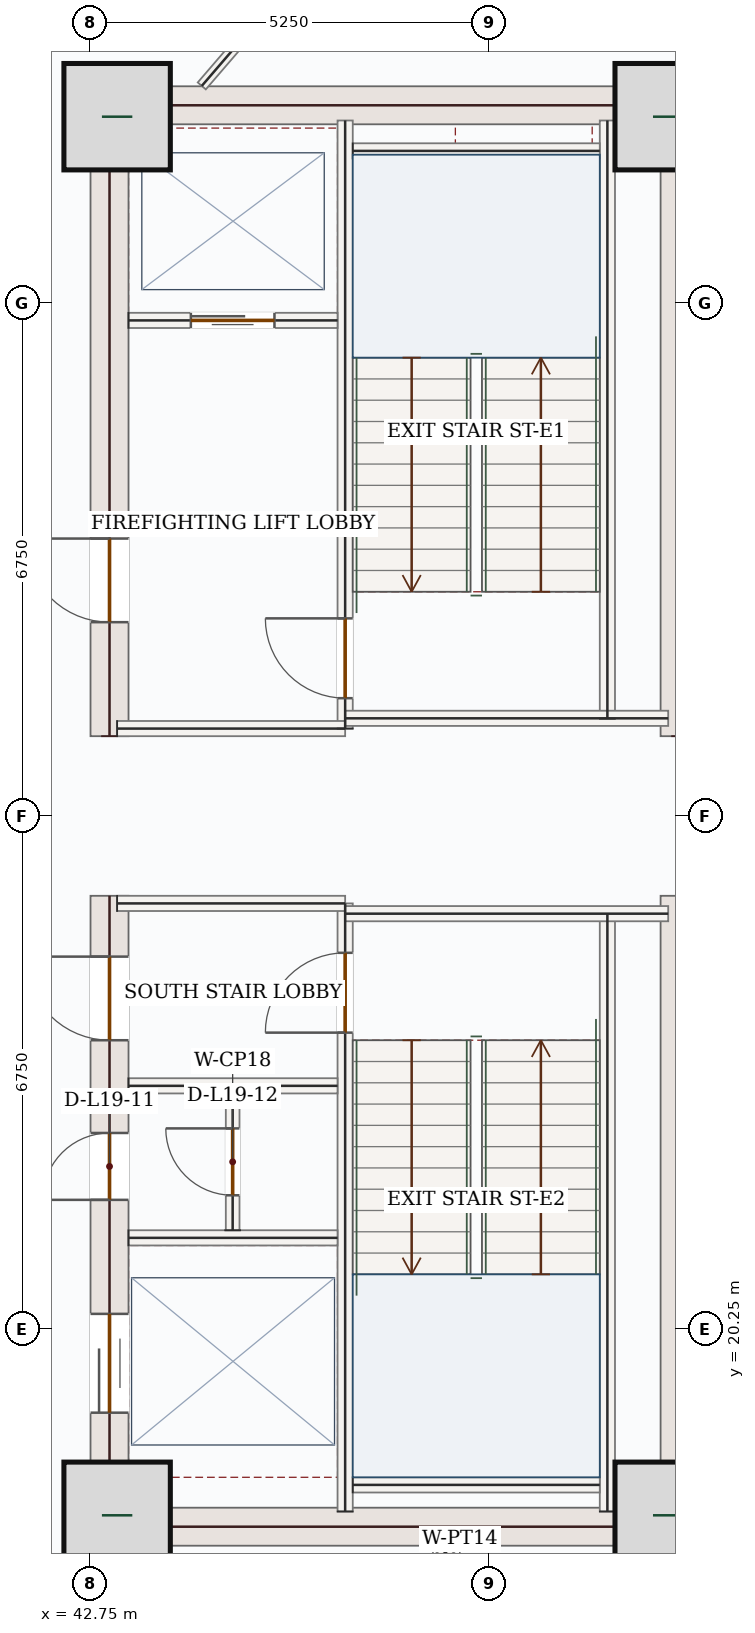
"""IFC4 building model, lengths in metres.
Left out: names, types, materials, properties, quantities, classifications, styles, units other than length and angle.
Written with IfcOpenShell. Run it as: python <this file> out.ifc"""

import sys

from ifc_helpers import new_model, si_unit, direction, frame, frame_2d, origin, origin_2d, place, context, subcontext, project, spatial, rectangle, extrude, source, transform, mapped, element, fill, save


model = new_model("IFC4")
c1 = context("Model", 3, precision=1e-05, world=origin(), true_north=direction((0.0, 1.0)))
c2 = subcontext(c1, "Body", "Model", "MODEL_VIEW")
j1 = project(units=[si_unit("LENGTHUNIT", "METRE"), si_unit("PLANEANGLEUNIT", "RADIAN")], contexts=[c1])
p1 = place(None, origin())
s1 = spatial("IfcSite", under=j1, at=p1, CompositionType="ELEMENT")
p2 = place(p1, origin())
s2 = spatial("IfcBuilding", under=s1, at=p2, CompositionType="ELEMENT")
p3 = place(p2, frame((0.0, 0.0, 87.9)))
s3 = spatial("IfcBuildingStorey", under=s2, at=p3, CompositionType="ELEMENT", Elevation=87.9)
p4 = place(p3, frame((43.0, 17.4, 0.0), z_axis=(0.0, 0.0, 1.0), x_axis=(0.0, 1.0, 0.0)))
e1 = element("IfcWall", 1, at=p4, inside=s3, PredefinedType="SHEAR", context=c2, shape_type="SweptSolid", body=[
    extrude(rectangle(XDim=8.55, YDim=0.5, at=frame_2d((4.275, 0.0))), origin(), (0.0, 0.0, 1.0), 3.95),
])
p5 = place(p4, frame((6.65, 0.0, 0.0)))
e2 = element("IfcOpeningElement", 2, at=p5, cuts=e1, PredefinedType="OPENING", context=c2, shape_type="SweptSolid", body=[
    extrude(rectangle(XDim=1.1, YDim=2.2, at=frame_2d((0.55, 1.1))), frame((0.0, 0.26, 0.0), z_axis=(0.0, -1.0, 0.0), x_axis=(1.0, 0.0, 0.0)), (0.0, 0.0, 1.0), 0.52),
])
p6 = place(p4, frame((1.75, 0.0, 0.0)))
e3 = element("IfcOpeningElement", 3, at=p6, cuts=e1, PredefinedType="OPENING", context=c2, shape_type="SweptSolid", body=[
    extrude(rectangle(XDim=1.3, YDim=2.2, at=frame_2d((0.65, 1.1))), frame((0.0, 0.26, 0.0), z_axis=(0.0, -1.0, 0.0), x_axis=(1.0, 0.0, 0.0)), (0.0, 0.0, 1.0), 0.52),
])
p7 = place(p4, frame((4.55, 0.0, 0.0)))
e4 = element("IfcOpeningElement", 4, at=p7, cuts=e1, PredefinedType="OPENING", context=c2, shape_type="SweptSolid", body=[
    extrude(rectangle(XDim=0.88, YDim=2.1, at=frame_2d((0.44, 1.05))), frame((0.0, 0.26, 0.0), z_axis=(0.0, -1.0, 0.0), x_axis=(1.0, 0.0, 0.0)), (0.0, 0.0, 1.0), 0.52),
])
p8 = place(p3, frame((43.0, 28.05, 0.0), z_axis=(0.0, 0.0, 1.0), x_axis=(0.0, 1.0, 0.0)))
e5 = element("IfcWall", 5, at=p8, inside=s3, PredefinedType="SHEAR", context=c2, shape_type="SweptSolid", body=[
    extrude(rectangle(XDim=8.55, YDim=0.5, at=frame_2d((4.275, 0.0))), origin(), (0.0, 0.0, 1.0), 3.95),
])
p9 = place(p8, frame((1.5, 0.0, 0.0)))
e6 = element("IfcOpeningElement", 6, at=p9, cuts=e5, PredefinedType="OPENING", context=c2, shape_type="SweptSolid", body=[
    extrude(rectangle(XDim=1.1, YDim=2.2, at=frame_2d((0.55, 1.1))), frame((0.0, 0.26, 0.0), z_axis=(0.0, -1.0, 0.0), x_axis=(1.0, 0.0, 0.0)), (0.0, 0.0, 1.0), 0.52),
])
m1 = source(origin(), c2, "Body", "SweptSolid", [
    extrude(rectangle(XDim=8.55, YDim=0.5, at=frame_2d((4.275, 0.0))), origin(), (0.0, 0.0, 1.0), 3.95),
])
for number, where, z_axis, x_axis in (
    (7, (50.5, 17.4, 0.0), (0.0, 0.0, 1.0), (0.0, 1.0, 0.0)),
    (8, (50.5, 28.05, 0.0), (0.0, 0.0, 1.0), (0.0, 1.0, 0.0)),
):
    element("IfcWall", number, at=place(p3, frame(where, z_axis=z_axis, x_axis=x_axis)), inside=s3, PredefinedType="SHEAR", context=c2, shape_type="MappedRepresentation", body=[
        mapped(m1, transform((0.0, 0.0, 0.0), x_axis=(1.0, 0.0, 0.0), y_axis=(0.0, 1.0, 0.0), z_axis=(0.0, 0.0, 1.0), scale=1.0)),
    ])
m2 = source(origin(), c2, "Body", "SweptSolid", [
    extrude(rectangle(XDim=7.0, YDim=0.5, at=frame_2d((3.5, 0.0))), origin(), (0.0, 0.0, 1.0), 3.95),
])
for number, where, z_axis, x_axis in (
    (9, (43.25, 17.65, 0.0), (0.0, 0.0, 1.0), (1.0, 0.0, 0.0)),
    (10, (43.25, 36.35, 0.0), (0.0, 0.0, 1.0), (1.0, 0.0, 0.0)),
):
    element("IfcWall", number, at=place(p3, frame(where, z_axis=z_axis, x_axis=x_axis)), inside=s3, PredefinedType="SHEAR", context=c2, shape_type="MappedRepresentation", body=[
        mapped(m2, transform((0.0, 0.0, 0.0), x_axis=(1.0, 0.0, 0.0), y_axis=(0.0, 1.0, 0.0), z_axis=(0.0, 0.0, 1.0), scale=1.0)),
    ])
m3 = source(origin(), c2, "Body", "SweptSolid", [
    extrude(rectangle(XDim=1.4, YDim=1.4, at=origin_2d()), origin(), (0.0, 0.0, 1.0), 4.2),
])
for number, where, z_axis, x_axis in (
    (11, (43.1, 17.8, 0.0), (0.0, 0.0, 1.0), (1.0, 0.0, 0.0)),
    (12, (50.35, 17.8, 0.0), (0.0, 0.0, 1.0), (1.0, 0.0, 0.0)),
    (13, (43.1, 36.2, 0.0), (0.0, 0.0, 1.0), (1.0, 0.0, 0.0)),
    (14, (50.35, 36.2, 0.0), (0.0, 0.0, 1.0), (1.0, 0.0, 0.0)),
):
    element("IfcColumn", number, at=place(p3, frame(where, z_axis=z_axis, x_axis=x_axis)), inside=s3, PredefinedType="COLUMN", context=c2, shape_type="MappedRepresentation", body=[
        mapped(m3, transform((0.0, 0.0, 0.0), x_axis=(1.0, 0.0, 0.0), y_axis=(0.0, 1.0, 0.0), z_axis=(0.0, 0.0, 1.0), scale=1.0)),
    ])
p10 = place(p3, frame((53.06, 18.458, 0.0), z_axis=(0.0, 0.0, 1.0), x_axis=(-0.707106781187, -0.707106781187, 0.0)))
e15 = element("IfcWall", 15, at=p10, inside=s3, PredefinedType="SOLIDWALL", context=c2, shape_type="SweptSolid", body=[
    extrude(rectangle(XDim=5.258, YDim=0.32, at=frame_2d((2.629, 0.0))), origin(), (0.0, 0.0, 1.0), 3.95),
])
p11 = place(p10, frame((1.429, 0.0, 0.85)))
e16 = element("IfcOpeningElement", 16, at=p11, cuts=e15, PredefinedType="OPENING", context=c2, shape_type="SweptSolid", body=[
    extrude(rectangle(XDim=2.4, YDim=1.8, at=frame_2d((1.2, 0.9))), frame((0.0, 0.17, 0.0), z_axis=(0.0, -1.0, 0.0), x_axis=(1.0, 0.0, 0.0)), (0.0, 0.0, 1.0), 0.34),
])
m4 = source(origin(), c2, "Body", "SweptSolid", [
    extrude(rectangle(XDim=5.623, YDim=0.32, at=frame_2d((2.812, 0.0))), origin(), (0.0, 0.0, 1.0), 3.95),
])
p12 = place(p3, frame((49.342, 39.26, 0.0), z_axis=(0.0, 0.0, 1.0), x_axis=(0.66122376427, -0.750188731963, 0.0)))
e17 = element("IfcWall", 17, at=p12, inside=s3, PredefinedType="SOLIDWALL", context=c2, shape_type="MappedRepresentation", body=[
    mapped(m4, transform((0.0, 0.0, 0.0), x_axis=(1.0, 0.0, 0.0), y_axis=(0.0, 1.0, 0.0), z_axis=(0.0, 0.0, 1.0), scale=1.0)),
])
m5 = source(origin(), c2, "Body", "SweptSolid", [
    extrude(rectangle(XDim=7.87, YDim=0.2, at=frame_2d((3.935, 0.0))), origin(), (0.0, 0.0, 1.0), 3.95),
])
for number, where, z_axis, x_axis in (
    (18, (49.55, 17.85, 0.0), (0.0, 0.0, 1.0), (0.0, 1.0, 0.0)),
    (19, (49.55, 28.28, 0.0), (0.0, 0.0, 1.0), (0.0, 1.0, 0.0)),
):
    element("IfcWall", number, at=place(p3, frame(where, z_axis=z_axis, x_axis=x_axis)), inside=s3, PredefinedType="SOLIDWALL", context=c2, shape_type="MappedRepresentation", body=[
        mapped(m5, transform((0.0, 0.0, 0.0), x_axis=(1.0, 0.0, 0.0), y_axis=(0.0, 1.0, 0.0), z_axis=(0.0, 0.0, 1.0), scale=1.0)),
    ])
p13 = place(p3, frame((46.1, 17.85, 0.0), z_axis=(0.0, 0.0, 1.0), x_axis=(0.0, 1.0, 0.0)))
e20 = element("IfcWall", 20, at=p13, inside=s3, PredefinedType="SOLIDWALL", context=c2, shape_type="SweptSolid", body=[
    extrude(rectangle(XDim=8.0, YDim=0.2, at=frame_2d((4.0, 0.0))), origin(), (0.0, 0.0, 1.0), 3.95),
])
p14 = place(p13, frame((6.3, 0.0, 0.0)))
e21 = element("IfcOpeningElement", 21, at=p14, cuts=e20, PredefinedType="OPENING", context=c2, shape_type="SweptSolid", body=[
    extrude(rectangle(XDim=1.05, YDim=2.15, at=frame_2d((0.525, 1.075))), frame((0.0, 0.11, 0.0), z_axis=(0.0, -1.0, 0.0), x_axis=(1.0, 0.0, 0.0)), (0.0, 0.0, 1.0), 0.22),
])
p15 = place(p3, frame((46.1, 28.15, 0.0), z_axis=(0.0, 0.0, 1.0), x_axis=(0.0, 1.0, 0.0)))
e22 = element("IfcWall", 22, at=p15, inside=s3, PredefinedType="SOLIDWALL", context=c2, shape_type="SweptSolid", body=[
    extrude(rectangle(XDim=8.0, YDim=0.2, at=frame_2d((4.0, 0.0))), origin(), (0.0, 0.0, 1.0), 3.95),
])
p16 = place(p15, frame((0.4, 0.0, 0.0)))
e23 = element("IfcOpeningElement", 23, at=p16, cuts=e22, PredefinedType="OPENING", context=c2, shape_type="SweptSolid", body=[
    extrude(rectangle(XDim=1.05, YDim=2.15, at=frame_2d((0.525, 1.075))), frame((0.0, 0.11, 0.0), z_axis=(0.0, -1.0, 0.0), x_axis=(1.0, 0.0, 0.0)), (0.0, 0.0, 1.0), 0.22),
])
m6 = source(origin(), c2, "Body", "SweptSolid", [
    extrude(rectangle(XDim=3.0, YDim=0.2, at=frame_2d((1.5, 0.0))), origin(), (0.0, 0.0, 1.0), 3.95),
])
p17 = place(p3, frame((43.1, 25.85, 0.0), z_axis=(0.0, 0.0, 1.0), x_axis=(1.0, 0.0, 0.0)))
e24 = element("IfcWall", 24, at=p17, inside=s3, PredefinedType="SOLIDWALL", context=c2, shape_type="MappedRepresentation", body=[
    mapped(m6, transform((0.0, 0.0, 0.0), x_axis=(1.0, 0.0, 0.0), y_axis=(0.0, 1.0, 0.0), z_axis=(0.0, 0.0, 1.0), scale=1.0)),
])
m7 = source(origin(), c2, "Body", "SweptSolid", [
    extrude(rectangle(XDim=4.25, YDim=0.2, at=frame_2d((2.125, 0.0))), origin(), (0.0, 0.0, 1.0), 3.95),
])
p18 = place(p3, frame((46.1, 25.715, 0.0), z_axis=(0.0, 0.0, 1.0), x_axis=(1.0, 0.0, 0.0)))
e25 = element("IfcWall", 25, at=p18, inside=s3, PredefinedType="SOLIDWALL", context=c2, shape_type="MappedRepresentation", body=[
    mapped(m7, transform((0.0, 0.0, 0.0), x_axis=(1.0, 0.0, 0.0), y_axis=(0.0, 1.0, 0.0), z_axis=(0.0, 0.0, 1.0), scale=1.0)),
])
p19 = place(p3, frame((43.1, 28.15, 0.0), z_axis=(0.0, 0.0, 1.0), x_axis=(1.0, 0.0, 0.0)))
e26 = element("IfcWall", 26, at=p19, inside=s3, PredefinedType="SOLIDWALL", context=c2, shape_type="MappedRepresentation", body=[
    mapped(m6, transform((0.0, 0.0, 0.0), x_axis=(1.0, 0.0, 0.0), y_axis=(0.0, 1.0, 0.0), z_axis=(0.0, 0.0, 1.0), scale=1.0)),
])
p20 = place(p3, frame((46.1, 28.285, 0.0), z_axis=(0.0, 0.0, 1.0), x_axis=(1.0, 0.0, 0.0)))
e27 = element("IfcWall", 27, at=p20, inside=s3, PredefinedType="SOLIDWALL", context=c2, shape_type="MappedRepresentation", body=[
    mapped(m7, transform((0.0, 0.0, 0.0), x_axis=(1.0, 0.0, 0.0), y_axis=(0.0, 1.0, 0.0), z_axis=(0.0, 0.0, 1.0), scale=1.0)),
])
m8 = source(origin(), c2, "Body", "SweptSolid", [
    extrude(rectangle(XDim=3.25, YDim=0.2, at=frame_2d((1.625, 0.0))), origin(), (0.0, 0.0, 1.0), 3.95),
])
for number, where, z_axis, x_axis in (
    (28, (46.2, 35.75, 0.0), (0.0, 0.0, 1.0), (1.0, 0.0, 0.0)),
    (29, (46.2, 18.2, 0.0), (0.0, 0.0, 1.0), (1.0, 0.0, 0.0)),
):
    element("IfcWall", number, at=place(p3, frame(where, z_axis=z_axis, x_axis=x_axis)), inside=s3, PredefinedType="SOLIDWALL", context=c2, shape_type="MappedRepresentation", body=[
        mapped(m8, transform((0.0, 0.0, 0.0), x_axis=(1.0, 0.0, 0.0), y_axis=(0.0, 1.0, 0.0), z_axis=(0.0, 0.0, 1.0), scale=1.0)),
    ])
p21 = place(p3, frame((43.25, 33.52, 0.0), z_axis=(0.0, 0.0, 1.0), x_axis=(1.0, 0.0, 0.0)))
e30 = element("IfcWall", 30, at=p21, inside=s3, PredefinedType="SOLIDWALL", context=c2, shape_type="SweptSolid", body=[
    extrude(rectangle(XDim=2.75, YDim=0.2, at=frame_2d((1.375, 0.0))), origin(), (0.0, 0.0, 1.0), 3.95),
])
p22 = place(p21, frame((0.82, 0.0, 0.0)))
e31 = element("IfcOpeningElement", 31, at=p22, cuts=e30, PredefinedType="OPENING", context=c2, shape_type="SweptSolid", body=[
    extrude(rectangle(XDim=1.1, YDim=2.15, at=frame_2d((0.55, 1.075))), frame((0.0, 0.11, 0.0), z_axis=(0.0, -1.0, 0.0), x_axis=(1.0, 0.0, 0.0)), (0.0, 0.0, 1.0), 0.22),
])
m9 = source(origin(), c2, "Body", "SweptSolid", [
    extrude(rectangle(XDim=2.75, YDim=0.2, at=frame_2d((1.375, 0.0))), origin(), (0.0, 0.0, 1.0), 3.95),
])
for number, where, z_axis, x_axis in (
    (32, (43.25, 23.45, 0.0), (0.0, 0.0, 1.0), (1.0, 0.0, 0.0)),
    (33, (43.25, 21.45, 0.0), (0.0, 0.0, 1.0), (1.0, 0.0, 0.0)),
):
    element("IfcWall", number, at=place(p3, frame(where, z_axis=z_axis, x_axis=x_axis)), inside=s3, PredefinedType="SOLIDWALL", context=c2, shape_type="MappedRepresentation", body=[
        mapped(m9, transform((0.0, 0.0, 0.0), x_axis=(1.0, 0.0, 0.0), y_axis=(0.0, 1.0, 0.0), z_axis=(0.0, 0.0, 1.0), scale=1.0)),
    ])
p23 = place(p3, frame((44.62, 21.55, 0.0), z_axis=(0.0, 0.0, 1.0), x_axis=(0.0, 1.0, 0.0)))
e34 = element("IfcWall", 34, at=p23, inside=s3, PredefinedType="PARTITIONING", context=c2, shape_type="SweptSolid", body=[
    extrude(rectangle(XDim=1.8, YDim=0.18, at=frame_2d((0.9, 0.0))), origin(), (0.0, 0.0, 1.0), 3.95),
])
p24 = place(p23, frame((0.46, 0.0, 0.0)))
e35 = element("IfcOpeningElement", 35, at=p24, cuts=e34, PredefinedType="OPENING", context=c2, shape_type="SweptSolid", body=[
    extrude(rectangle(XDim=0.88, YDim=2.1, at=frame_2d((0.44, 1.05))), frame((0.0, 0.1, 0.0), z_axis=(0.0, -1.0, 0.0), x_axis=(1.0, 0.0, 0.0)), (0.0, 0.0, 1.0), 0.2),
])
m10 = source(origin(), c2, "Body", "SweptSolid", [
    extrude(rectangle(XDim=0.761, YDim=0.14, at=frame_2d((0.38, 0.0))), origin(), (0.0, 0.0, 1.0), 3.95),
])
p25 = place(p3, frame((47.318, 17.395, 0.0), z_axis=(0.0, 0.0, 1.0), x_axis=(0.764128340752, -0.645064243978, 0.0)))
e36 = element("IfcWall", 36, at=p25, inside=s3, PredefinedType="PARTITIONING", context=c2, shape_type="MappedRepresentation", body=[
    mapped(m10, transform((0.0, 0.0, 0.0), x_axis=(1.0, 0.0, 0.0), y_axis=(0.0, 1.0, 0.0), z_axis=(0.0, 0.0, 1.0), scale=1.0)),
])
m11 = source(origin(), c2, "Body", "SweptSolid", [
    extrude(rectangle(XDim=3.29, YDim=0.14, at=frame_2d((1.645, 0.0))), origin(), (0.0, 0.0, 1.0), 3.95),
])
p26 = place(p3, frame((46.36, 39.099, 0.0), z_axis=(0.0, 0.0, 1.0), x_axis=(-0.652214149627, -0.758034763732, 0.0)))
e37 = element("IfcWall", 37, at=p26, inside=s3, PredefinedType="PARTITIONING", context=c2, shape_type="MappedRepresentation", body=[
    mapped(m11, transform((0.0, 0.0, 0.0), x_axis=(1.0, 0.0, 0.0), y_axis=(0.0, 1.0, 0.0), z_axis=(0.0, 0.0, 1.0), scale=1.0)),
])
m12 = source(origin(), c2, "Body", "SweptSolid", [
    extrude(rectangle(XDim=5.09, YDim=0.14, at=frame_2d((2.545, 0.0))), origin(), (0.0, 0.0, 1.0), 3.95),
])
p27 = place(p3, frame((49.932, 38.84, 0.0), z_axis=(0.0, 0.0, 1.0), x_axis=(0.707106781187, -0.707106781187, 0.0)))
e38 = element("IfcWall", 38, at=p27, inside=s3, PredefinedType="PARTITIONING", context=c2, shape_type="MappedRepresentation", body=[
    mapped(m12, transform((0.0, 0.0, 0.0), x_axis=(1.0, 0.0, 0.0), y_axis=(0.0, 1.0, 0.0), z_axis=(0.0, 0.0, 1.0), scale=1.0)),
])
m13 = source(origin(), c2, "Body", "SweptSolid", [
    extrude(rectangle(XDim=2.4, YDim=1.8, at=frame_2d((1.2, 0.9))), frame((0.0, 0.03, 0.0), z_axis=(0.0, -1.0, 0.0), x_axis=(1.0, 0.0, 0.0)), (0.0, 0.0, 1.0), 0.06),
])
p28 = place(p11, origin())
e39 = element("IfcWindow", 39, at=p28, inside=s3, PartitioningType="DOUBLE_PANEL_VERTICAL", PredefinedType="WINDOW", context=c2, shape_type="MappedRepresentation", body=[
    mapped(m13, transform((0.0, 0.0, 0.0), x_axis=(1.0, 0.0, 0.0), y_axis=(0.0, 1.0, 0.0), z_axis=(0.0, 0.0, 1.0), scale=1.0)),
])
fill(e16, e39)
m14 = source(origin(), c2, "Body", "SweptSolid", [
    extrude(rectangle(XDim=1.05, YDim=2.15, at=frame_2d((0.525, 1.075))), frame((0.0, 0.025, 0.0), z_axis=(0.0, -1.0, 0.0), x_axis=(1.0, 0.0, 0.0)), (0.0, 0.0, 1.0), 0.05),
])
p29 = place(p16, origin())
e40 = element("IfcDoor", 40, at=p29, inside=s3, OperationType="SINGLE_SWING_RIGHT", PredefinedType="DOOR", context=c2, shape_type="MappedRepresentation", body=[
    mapped(m14, transform((0.0, 0.0, 0.0), x_axis=(1.0, 0.0, 0.0), y_axis=(0.0, 1.0, 0.0), z_axis=(0.0, 0.0, 1.0), scale=1.0)),
])
fill(e23, e40)
p30 = place(p14, origin())
e41 = element("IfcDoor", 41, at=p30, inside=s3, OperationType="SINGLE_SWING_LEFT", PredefinedType="DOOR", context=c2, shape_type="MappedRepresentation", body=[
    mapped(m14, transform((0.0, 0.0, 0.0), x_axis=(1.0, 0.0, 0.0), y_axis=(0.0, 1.0, 0.0), z_axis=(0.0, 0.0, 1.0), scale=1.0)),
])
fill(e21, e41)
m15 = source(origin(), c2, "Body", "SweptSolid", [
    extrude(rectangle(XDim=1.1, YDim=2.15, at=frame_2d((0.55, 1.075))), frame((0.0, 0.025, 0.0), z_axis=(0.0, -1.0, 0.0), x_axis=(1.0, 0.0, 0.0)), (0.0, 0.0, 1.0), 0.05),
])
p31 = place(p22, origin())
e42 = element("IfcDoor", 42, at=p31, inside=s3, OperationType="DOUBLE_DOOR_SLIDING", PredefinedType="DOOR", context=c2, shape_type="MappedRepresentation", body=[
    mapped(m15, transform((0.0, 0.0, 0.0), x_axis=(1.0, 0.0, 0.0), y_axis=(0.0, 1.0, 0.0), z_axis=(0.0, 0.0, 1.0), scale=1.0)),
])
fill(e31, e42)
m16 = source(origin(), c2, "Body", "SweptSolid", [
    extrude(rectangle(XDim=1.1, YDim=2.2, at=frame_2d((0.55, 1.1))), frame((0.0, 0.025, 0.0), z_axis=(0.0, -1.0, 0.0), x_axis=(1.0, 0.0, 0.0)), (0.0, 0.0, 1.0), 0.05),
])
p32 = place(p9, origin())
e43 = element("IfcDoor", 43, at=p32, inside=s3, OperationType="SINGLE_SWING_RIGHT", PredefinedType="DOOR", context=c2, shape_type="MappedRepresentation", body=[
    mapped(m16, transform((0.0, 0.0, 0.0), x_axis=(1.0, 0.0, 0.0), y_axis=(0.0, 1.0, 0.0), z_axis=(0.0, 0.0, 1.0), scale=1.0)),
])
fill(e6, e43)
p33 = place(p5, origin())
e44 = element("IfcDoor", 44, at=p33, inside=s3, OperationType="SINGLE_SWING_RIGHT", PredefinedType="DOOR", context=c2, shape_type="MappedRepresentation", body=[
    mapped(m16, transform((0.0, 0.0, 0.0), x_axis=(1.0, 0.0, 0.0), y_axis=(0.0, 1.0, 0.0), z_axis=(0.0, 0.0, 1.0), scale=1.0)),
])
fill(e2, e44)
m17 = source(origin(), c2, "Body", "SweptSolid", [
    extrude(rectangle(XDim=1.3, YDim=2.2, at=frame_2d((0.65, 1.1))), frame((0.0, 0.025, 0.0), z_axis=(0.0, -1.0, 0.0), x_axis=(1.0, 0.0, 0.0)), (0.0, 0.0, 1.0), 0.05),
])
p34 = place(p6, origin())
e45 = element("IfcDoor", 45, at=p34, inside=s3, OperationType="DOUBLE_DOOR_SLIDING", PredefinedType="DOOR", context=c2, shape_type="MappedRepresentation", body=[
    mapped(m17, transform((0.0, 0.0, 0.0), x_axis=(1.0, 0.0, 0.0), y_axis=(0.0, 1.0, 0.0), z_axis=(0.0, 0.0, 1.0), scale=1.0)),
])
fill(e3, e45)
m18 = source(origin(), c2, "Body", "SweptSolid", [
    extrude(rectangle(XDim=0.88, YDim=2.1, at=frame_2d((0.44, 1.05))), frame((0.0, 0.025, 0.0), z_axis=(0.0, -1.0, 0.0), x_axis=(1.0, 0.0, 0.0)), (0.0, 0.0, 1.0), 0.05),
])
p35 = place(p7, origin())
e46 = element("IfcDoor", 46, at=p35, inside=s3, OperationType="SINGLE_SWING_LEFT", PredefinedType="DOOR", context=c2, shape_type="MappedRepresentation", body=[
    mapped(m18, transform((0.0, 0.0, 0.0), x_axis=(1.0, 0.0, 0.0), y_axis=(0.0, 1.0, 0.0), z_axis=(0.0, 0.0, 1.0), scale=1.0)),
])
fill(e4, e46)
p36 = place(p24, origin())
e47 = element("IfcDoor", 47, at=p36, inside=s3, OperationType="SINGLE_SWING_RIGHT", PredefinedType="DOOR", context=c2, shape_type="MappedRepresentation", body=[
    mapped(m18, transform((0.0, 0.0, 0.0), x_axis=(1.0, 0.0, 0.0), y_axis=(0.0, 1.0, 0.0), z_axis=(0.0, 0.0, 1.0), scale=1.0)),
])
fill(e35, e47)
save(model, sys.argv[1])
